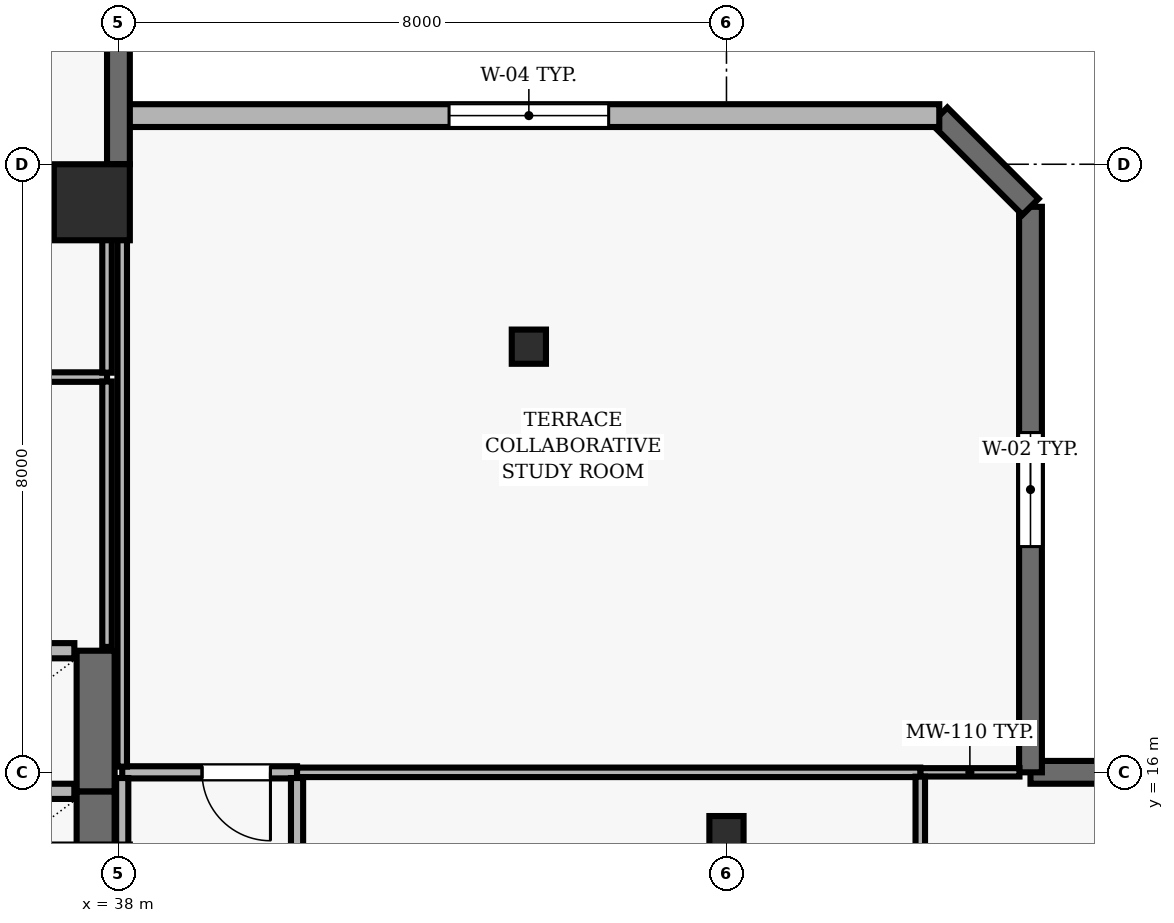
"""IFC4 building model, lengths in metres.
Left out: names, types, materials, properties, quantities, classifications, styles, units other than length and angle.
Written with IfcOpenShell. Run it as: python <this file> out.ifc"""

import sys

from ifc_helpers import new_model, si_unit, direction, frame, frame_2d, origin, origin_2d, place, context, subcontext, project, spatial, rectangle, hollow_rectangle, extrude, element, fill, save


model = new_model("IFC4")
c1 = context("Model", 3, precision=1e-05, world=origin(), true_north=direction((0.0, 1.0)))
c2 = subcontext(c1, "Body", "Model", "MODEL_VIEW")
j1 = project(units=[si_unit("LENGTHUNIT", "METRE"), si_unit("PLANEANGLEUNIT", "RADIAN")], contexts=[c1])
p1 = place(None, origin())
s1 = spatial("IfcSite", under=j1, at=p1, CompositionType="ELEMENT")
p2 = place(p1, origin())
s2 = spatial("IfcBuilding", under=s1, at=p2, CompositionType="ELEMENT")
p3 = place(p2, frame((0.0, 0.0, 183.6)))
s3 = spatial("IfcBuildingStorey", under=s2, at=p3, CompositionType="ELEMENT", Elevation=183.6)
p4 = place(p3, frame((37.65, 23.5, 0.0), z_axis=(0.0, 0.0, 1.0), x_axis=(1.0, 0.0, 0.0)))
e1 = element("IfcColumn", 1, at=p4, inside=s3, PredefinedType="COLUMN", context=c2, shape_type="SweptSolid", body=[
    extrude(rectangle(XDim=1.0, YDim=1.0, at=origin_2d()), origin(), (0.0, 0.0, 1.0), 3.9),
])
for number, where, z_axis, x_axis in (
    (2, (46.0, 15.2, 0.0), (0.0, 0.0, 1.0), (1.0, 0.0, 0.0)),
    (3, (43.4, 21.6, 0.0), (0.0, 0.0, 1.0), (1.0, 0.0, 0.0)),
):
    element("IfcColumn", number, at=place(p3, frame(where, z_axis=z_axis, x_axis=x_axis)), inside=s3, PredefinedType="COLUMN", context=c2, shape_type="SweptSolid", body=[
        extrude(hollow_rectangle(XDim=0.45, YDim=0.45, WallThickness=0.02, at=origin_2d()), origin(), (0.0, 0.0, 1.0), 3.9),
    ])
p5 = place(p3, frame((62.7, 16.0, 0.0), z_axis=(0.0, 0.0, 1.0), x_axis=(-1.0, 0.0, 0.0)))
e4 = element("IfcWall", 4, at=p5, inside=s3, PredefinedType="SOLIDWALL", context=c2, shape_type="SweptSolid", body=[
    extrude(rectangle(XDim=12.7, YDim=0.3, at=frame_2d((6.35, 0.0))), origin(), (0.0, 0.0, 1.0), 3.69),
])
p6 = place(p5, frame((6.85, 0.0, 0.0)))
e5 = element("IfcOpeningElement", 5, at=p6, cuts=e4, PredefinedType="OPENING", context=c2, shape_type="SweptSolid", body=[
    extrude(rectangle(XDim=1.0, YDim=2.2, at=frame_2d((0.5, 1.1))), frame((0.0, 0.16, 0.0), z_axis=(0.0, -1.0, 0.0), x_axis=(1.0, 0.0, 0.0)), (0.0, 0.0, 1.0), 0.32),
])
p7 = place(p5, frame((2.575, 0.0, 0.9)))
e6 = element("IfcOpeningElement", 6, at=p7, cuts=e4, PredefinedType="OPENING", context=c2, shape_type="SweptSolid", body=[
    extrude(rectangle(XDim=1.2, YDim=1.6, at=frame_2d((0.6, 0.8))), frame((0.0, 0.16, 0.0), z_axis=(0.0, -1.0, 0.0), x_axis=(1.0, 0.0, 0.0)), (0.0, 0.0, 1.0), 0.32),
])
p8 = place(p5, frame((8.925, 0.0, 0.9)))
e7 = element("IfcOpeningElement", 7, at=p8, cuts=e4, PredefinedType="OPENING", context=c2, shape_type="SweptSolid", body=[
    extrude(rectangle(XDim=1.2, YDim=1.6, at=frame_2d((0.6, 0.8))), frame((0.0, 0.16, 0.0), z_axis=(0.0, -1.0, 0.0), x_axis=(1.0, 0.0, 0.0)), (0.0, 0.0, 1.0), 0.32),
])
p9 = place(p3, frame((50.0, 16.0, 0.0), z_axis=(0.0, 0.0, 1.0), x_axis=(0.0, 1.0, 0.0)))
e8 = element("IfcWall", 8, at=p9, inside=s3, PredefinedType="SOLIDWALL", context=c2, shape_type="SweptSolid", body=[
    extrude(rectangle(XDim=7.44, YDim=0.3, at=frame_2d((3.72, 0.0))), origin(), (0.0, 0.0, 1.0), 3.69),
])
p10 = place(p9, frame((2.97, 0.0, 0.9)))
e9 = element("IfcOpeningElement", 9, at=p10, cuts=e8, PredefinedType="OPENING", context=c2, shape_type="SweptSolid", body=[
    extrude(rectangle(XDim=1.5, YDim=1.6, at=frame_2d((0.75, 0.8))), frame((0.0, 0.16, 0.0), z_axis=(0.0, -1.0, 0.0), x_axis=(1.0, 0.0, 0.0)), (0.0, 0.0, 1.0), 0.32),
])
p11 = place(p3, frame((50.0, 23.44, 0.0), z_axis=(0.0, 0.0, 1.0), x_axis=(-0.707106781187, 0.707106781187, 0.0)))
e10 = element("IfcWall", 10, at=p11, inside=s3, PredefinedType="SOLIDWALL", context=c2, shape_type="SweptSolid", body=[
    extrude(rectangle(XDim=1.697, YDim=0.3, at=frame_2d((0.849, 0.0))), origin(), (0.0, 0.0, 1.0), 3.69),
])
p12 = place(p3, frame((48.8, 24.64, 0.0), z_axis=(0.0, 0.0, 1.0), x_axis=(-1.0, 0.0, 0.0)))
e11 = element("IfcWall", 11, at=p12, inside=s3, PredefinedType="SOLIDWALL", context=c2, shape_type="SweptSolid", body=[
    extrude(rectangle(XDim=10.8, YDim=0.3, at=frame_2d((5.4, 0.0))), origin(), (0.0, 0.0, 1.0), 3.69),
])
p13 = place(p12, frame((4.35, 0.0, 0.9)))
e12 = element("IfcOpeningElement", 12, at=p13, cuts=e11, PredefinedType="OPENING", context=c2, shape_type="SweptSolid", body=[
    extrude(rectangle(XDim=2.1, YDim=1.6, at=frame_2d((1.05, 0.8))), frame((0.0, 0.16, 0.0), z_axis=(0.0, -1.0, 0.0), x_axis=(1.0, 0.0, 0.0)), (0.0, 0.0, 1.0), 0.32),
])
p14 = place(p3, frame((38.0, 24.0, 0.0), z_axis=(0.0, 0.0, 1.0), x_axis=(0.0, 1.0, 0.0)))
e13 = element("IfcWall", 13, at=p14, inside=s3, PredefinedType="SOLIDWALL", context=c2, shape_type="SweptSolid", body=[
    extrude(rectangle(XDim=16.7, YDim=0.3, at=frame_2d((8.35, 0.0))), origin(), (0.0, 0.0, 1.0), 3.69),
])
p15 = place(p14, frame((2.03, 0.0, 0.0)))
e14 = element("IfcOpeningElement", 14, at=p15, cuts=e13, PredefinedType="OPENING", context=c2, shape_type="SweptSolid", body=[
    extrude(rectangle(XDim=1.0, YDim=2.2, at=frame_2d((0.5, 1.1))), frame((0.0, 0.16, 0.0), z_axis=(0.0, -1.0, 0.0), x_axis=(1.0, 0.0, 0.0)), (0.0, 0.0, 1.0), 0.32),
])
p16 = place(p3, frame((37.7, 13.9, 0.0), z_axis=(0.0, 0.0, 1.0), x_axis=(0.0, 1.0, 0.0)))
e15 = element("IfcWall", 15, at=p16, inside=s3, PredefinedType="SHEAR", context=c2, shape_type="SweptSolid", body=[
    extrude(rectangle(XDim=1.85, YDim=0.5, at=frame_2d((0.925, 0.0))), origin(), (0.0, 0.0, 1.0), 3.69),
])
p17 = place(p3, frame((37.42, 15.75, 0.0), z_axis=(0.0, 0.0, 1.0), x_axis=(-1.0, 0.0, 0.0)))
e16 = element("IfcWall", 16, at=p17, inside=s3, PredefinedType="SOLIDWALL", context=c2, shape_type="SweptSolid", body=[
    extrude(rectangle(XDim=2.14, YDim=0.2, at=frame_2d((1.07, 0.0))), origin(), (0.0, 0.0, 1.0), 3.69),
])
p18 = place(p3, frame((37.7, 15.75, 0.0), z_axis=(0.0, 0.0, 1.0), x_axis=(0.0, 1.0, 0.0)))
e17 = element("IfcWall", 17, at=p18, inside=s3, PredefinedType="SHEAR", context=c2, shape_type="SweptSolid", body=[
    extrude(rectangle(XDim=1.85, YDim=0.5, at=frame_2d((0.925, 0.0))), origin(), (0.0, 0.0, 1.0), 3.69),
])
p19 = place(p3, frame((37.42, 17.6, 0.0), z_axis=(0.0, 0.0, 1.0), x_axis=(-1.0, 0.0, 0.0)))
e18 = element("IfcWall", 18, at=p19, inside=s3, PredefinedType="SOLIDWALL", context=c2, shape_type="SweptSolid", body=[
    extrude(rectangle(XDim=2.14, YDim=0.2, at=frame_2d((1.07, 0.0))), origin(), (0.0, 0.0, 1.0), 3.69),
])
p20 = place(p3, frame((35.85, 21.2, 0.0), z_axis=(0.0, 0.0, 1.0), x_axis=(1.0, 0.0, 0.0)))
e19 = element("IfcWall", 19, at=p20, inside=s3, PredefinedType="PARTITIONING", context=c2, shape_type="SweptSolid", body=[
    extrude(rectangle(XDim=2.0, YDim=0.125, at=frame_2d((1.0, 0.0))), origin(), (0.0, 0.0, 1.0), 3.139),
])
p21 = place(p3, frame((37.85, 23.85, 0.0), z_axis=(0.0, 0.0, 1.0), x_axis=(-1.0, 0.0, 0.0)))
e20 = element("IfcWall", 20, at=p21, inside=s3, PredefinedType="PARTITIONING", context=c2, shape_type="SweptSolid", body=[
    extrude(rectangle(XDim=2.0, YDim=0.16, at=frame_2d((1.0, 0.0))), origin(), (0.0, 0.0, 1.0), 3.139),
])
p22 = place(p3, frame((40.35, 16.0, 0.0), z_axis=(0.0, 0.0, 1.0), x_axis=(-1.0, 0.0, 0.0)))
e21 = element("IfcWall", 21, at=p22, inside=s3, PredefinedType="PARTITIONING", context=c2, shape_type="SweptSolid", body=[
    extrude(rectangle(XDim=2.3, YDim=0.16, at=frame_2d((1.15, 0.0))), origin(), (0.0, 0.0, 1.0), 3.69),
])
p23 = place(p22, frame((0.35, 0.0, 0.0)))
e22 = element("IfcOpeningElement", 22, at=p23, cuts=e21, PredefinedType="OPENING", context=c2, shape_type="SweptSolid", body=[
    extrude(rectangle(XDim=0.9, YDim=2.1, at=frame_2d((0.45, 1.05))), frame((0.0, 0.09, 0.0), z_axis=(0.0, -1.0, 0.0), x_axis=(1.0, 0.0, 0.0)), (0.0, 0.0, 1.0), 0.18),
])
p24 = place(p3, frame((48.55, 16.0, 0.0), z_axis=(0.0, 0.0, 1.0), x_axis=(1.0, 0.0, 0.0)))
e23 = element("IfcWall", 23, at=p24, inside=s3, PredefinedType="MOVABLE", context=c2, shape_type="SweptSolid", body=[
    extrude(rectangle(XDim=1.305, YDim=0.11, at=frame_2d((0.652, 0.0))), origin(), (0.0, 0.0, 1.0), 3.39),
])
p25 = place(p3, frame((48.55, 16.0, 0.0), z_axis=(0.0, 0.0, 1.0), x_axis=(-1.0, 0.0, 0.0)))
e24 = element("IfcWall", 24, at=p25, inside=s3, PredefinedType="PARTITIONING", context=c2, shape_type="SweptSolid", body=[
    extrude(rectangle(XDim=8.2, YDim=0.125, at=frame_2d((4.1, 0.0))), origin(), (0.0, 0.0, 1.0), 3.39),
])
p26 = place(p3, frame((37.85, 17.65, 0.0), z_axis=(0.0, 0.0, 1.0), x_axis=(0.0, 1.0, 0.0)))
e25 = element("IfcWall", 25, at=p26, inside=s3, PredefinedType="PARTITIONING", context=c2, shape_type="SweptSolid", body=[
    extrude(rectangle(XDim=3.492, YDim=0.125, at=frame_2d((1.746, 0.0))), origin(), (0.0, 0.0, 1.0), 3.139),
])
p27 = place(p3, frame((37.85, 21.258, 0.0), z_axis=(0.0, 0.0, 1.0), x_axis=(0.0, 1.0, 0.0)))
e26 = element("IfcWall", 26, at=p27, inside=s3, PredefinedType="PARTITIONING", context=c2, shape_type="SweptSolid", body=[
    extrude(rectangle(XDim=2.517, YDim=0.125, at=frame_2d((1.258, 0.0))), origin(), (0.0, 0.0, 1.0), 3.139),
])
p28 = place(p3, frame((38.05, 15.925, 0.0), z_axis=(0.0, 0.0, 1.0), x_axis=(0.0, -1.0, 0.0)))
e27 = element("IfcWall", 27, at=p28, inside=s3, PredefinedType="PARTITIONING", context=c2, shape_type="SweptSolid", body=[
    extrude(rectangle(XDim=6.375, YDim=0.16, at=frame_2d((3.188, 0.0))), origin(), (0.0, 0.0, 1.0), 3.139),
])
p29 = place(p3, frame((38.05, 24.0, 0.0), z_axis=(0.0, 0.0, 1.0), x_axis=(0.0, -1.0, 0.0)))
e28 = element("IfcWall", 28, at=p29, inside=s3, PredefinedType="PARTITIONING", context=c2, shape_type="SweptSolid", body=[
    extrude(rectangle(XDim=7.925, YDim=0.125, at=frame_2d((3.962, 0.0))), origin(), (0.0, 0.0, 1.0), 3.139),
])
p30 = place(p3, frame((40.35, 7.625, 0.0), z_axis=(0.0, 0.0, 1.0), x_axis=(0.0, 1.0, 0.0)))
e29 = element("IfcWall", 29, at=p30, inside=s3, PredefinedType="PARTITIONING", context=c2, shape_type="SweptSolid", body=[
    extrude(rectangle(XDim=8.3, YDim=0.16, at=frame_2d((4.15, 0.0))), origin(), (0.0, 0.0, 1.0), 3.343),
])
p31 = place(p30, frame((3.65, 0.0, 0.0)))
e30 = element("IfcOpeningElement", 30, at=p31, cuts=e29, PredefinedType="OPENING", context=c2, shape_type="SweptSolid", body=[
    extrude(rectangle(XDim=1.0, YDim=2.1, at=frame_2d((0.5, 1.05))), frame((0.0, 0.09, 0.0), z_axis=(0.0, -1.0, 0.0), x_axis=(1.0, 0.0, 0.0)), (0.0, 0.0, 1.0), 0.18),
])
p32 = place(p3, frame((48.55, 7.625, 0.0), z_axis=(0.0, 0.0, 1.0), x_axis=(0.0, 1.0, 0.0)))
e31 = element("IfcWall", 31, at=p32, inside=s3, PredefinedType="PARTITIONING", context=c2, shape_type="SweptSolid", body=[
    extrude(rectangle(XDim=8.318, YDim=0.125, at=frame_2d((4.159, 0.0))), origin(), (0.0, 0.0, 1.0), 3.69),
])
p33 = place(p10, origin())
e32 = element("IfcWindow", 32, at=p33, inside=s3, PartitioningType="SINGLE_PANEL", PredefinedType="WINDOW", context=c2, shape_type="SweptSolid", body=[
    extrude(rectangle(XDim=1.5, YDim=1.6, at=frame_2d((0.75, 0.8))), frame((0.0, 0.03, 0.0), z_axis=(0.0, -1.0, 0.0), x_axis=(1.0, 0.0, 0.0)), (0.0, 0.0, 1.0), 0.06),
])
fill(e9, e32)
p34 = place(p13, origin())
e33 = element("IfcWindow", 33, at=p34, inside=s3, PartitioningType="SINGLE_PANEL", PredefinedType="WINDOW", context=c2, shape_type="SweptSolid", body=[
    extrude(rectangle(XDim=2.1, YDim=1.6, at=frame_2d((1.05, 0.8))), frame((0.0, 0.03, 0.0), z_axis=(0.0, -1.0, 0.0), x_axis=(1.0, 0.0, 0.0)), (0.0, 0.0, 1.0), 0.06),
])
fill(e12, e33)
p35 = place(p23, origin())
e34 = element("IfcDoor", 34, at=p35, inside=s3, OperationType="SINGLE_SWING_LEFT", PredefinedType="DOOR", context=c2, shape_type="SweptSolid", body=[
    extrude(rectangle(XDim=0.9, YDim=2.1, at=frame_2d((0.45, 1.05))), frame((0.0, 0.025, 0.0), z_axis=(0.0, -1.0, 0.0), x_axis=(1.0, 0.0, 0.0)), (0.0, 0.0, 1.0), 0.05),
])
fill(e22, e34)
save(model, sys.argv[1])
